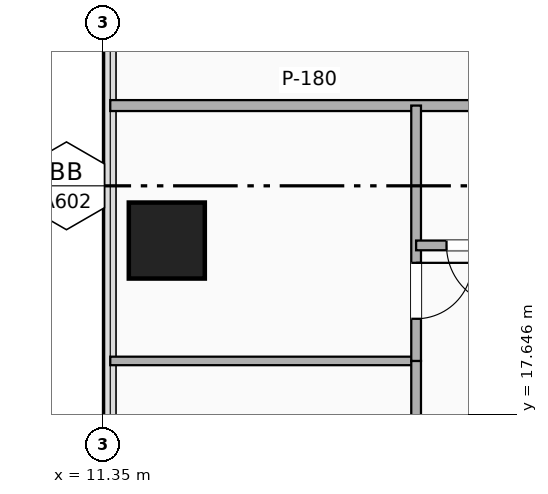
"""IFC4 building model, lengths in metres.
Left out: names, types, materials, properties, quantities, classifications, styles, units other than length and angle.
Written with IfcOpenShell. Run it as: python <this file> out.ifc"""

import sys

from ifc_helpers import new_model, si_unit, direction, frame, frame_2d, origin, origin_2d, place, context, subcontext, project, spatial, rectangle, extrude, element, fill, save


model = new_model("IFC4")
c1 = context("Model", 3, precision=1e-05, world=origin(), true_north=direction((0.0, 1.0)))
c2 = subcontext(c1, "Body", "Model", "MODEL_VIEW")
j1 = project(units=[si_unit("LENGTHUNIT", "METRE"), si_unit("PLANEANGLEUNIT", "RADIAN")], contexts=[c1])
p1 = place(None, origin())
s1 = spatial("IfcSite", under=j1, at=p1, CompositionType="ELEMENT")
p2 = place(p1, origin())
s2 = spatial("IfcBuilding", under=s1, at=p2, CompositionType="ELEMENT")
p3 = place(p2, frame((0.0, 0.0, 83.8)))
s3 = spatial("IfcBuildingStorey", under=s2, at=p3, CompositionType="ELEMENT", Elevation=83.8)
p4 = place(p3, frame((12.4, 20.5, -0.26), z_axis=(0.0, 0.0, 1.0), x_axis=(1.0, 0.0, 0.0)))
e1 = element("IfcColumn", 1, at=p4, inside=s3, PredefinedType="COLUMN", context=c2, shape_type="SweptSolid", body=[
    extrude(rectangle(XDim=1.25, YDim=1.25, at=origin_2d()), origin(), (0.0, 0.0, 1.0), 4.4),
])
p5 = place(p3, frame((11.47, 22.72, 0.0), z_axis=(0.0, 0.0, 1.0), x_axis=(1.0, 0.0, 0.0)))
e2 = element("IfcWall", 2, at=p5, inside=s3, PredefinedType="PARTITIONING", context=c2, shape_type="SweptSolid", body=[
    extrude(rectangle(XDim=6.55, YDim=0.18, at=frame_2d((3.275, 0.0))), origin(), (0.0, 0.0, 1.0), 3.503),
])
p6 = place(p3, frame((11.47, 18.52, 0.0), z_axis=(0.0, 0.0, 1.0), x_axis=(1.0, 0.0, 0.0)))
e3 = element("IfcWall", 3, at=p6, inside=s3, PredefinedType="PARTITIONING", context=c2, shape_type="SweptSolid", body=[
    extrude(rectangle(XDim=5.03, YDim=0.14, at=frame_2d((2.515, 0.0))), origin(), (0.0, 0.0, 1.0), 3.503),
])
p7 = place(p3, frame((16.5, 14.58, 0.0), z_axis=(0.0, 0.0, 1.0), x_axis=(0.0, 1.0, 0.0)))
e4 = element("IfcWall", 4, at=p7, inside=s3, PredefinedType="PARTITIONING", context=c2, shape_type="SweptSolid", body=[
    extrude(rectangle(XDim=3.94, YDim=0.16, at=frame_2d((1.97, 0.0))), origin(), (0.0, 0.0, 1.0), 3.822),
])
p8 = place(p7, frame((1.4, 0.0, 0.0)))
e5 = element("IfcOpeningElement", 5, at=p8, cuts=e4, PredefinedType="OPENING", context=c2, shape_type="SweptSolid", body=[
    extrude(rectangle(XDim=0.92, YDim=2.08, at=frame_2d((0.46, 1.04))), frame((0.0, 0.09, 0.0), z_axis=(0.0, -1.0, 0.0), x_axis=(1.0, 0.0, 0.0)), (0.0, 0.0, 1.0), 0.18),
])
p9 = place(p3, frame((16.5, 18.52, 0.0), z_axis=(0.0, 0.0, 1.0), x_axis=(0.0, 1.0, 0.0)))
e6 = element("IfcWall", 6, at=p9, inside=s3, PredefinedType="PARTITIONING", context=c2, shape_type="SweptSolid", body=[
    extrude(rectangle(XDim=4.2, YDim=0.16, at=frame_2d((2.1, 0.0))), origin(), (0.0, 0.0, 1.0), 3.213),
])
p10 = place(p9, frame((0.693, 0.0, 0.0)))
e7 = element("IfcOpeningElement", 7, at=p10, cuts=e6, PredefinedType="OPENING", context=c2, shape_type="SweptSolid", body=[
    extrude(rectangle(XDim=0.92, YDim=2.08, at=frame_2d((0.46, 1.04))), frame((0.0, 0.09, 0.0), z_axis=(0.0, -1.0, 0.0), x_axis=(1.0, 0.0, 0.0)), (0.0, 0.0, 1.0), 0.18),
])
p11 = place(p3, frame((16.5, 20.42, 0.0), z_axis=(0.0, 0.0, 1.0), x_axis=(1.0, 0.0, 0.0)))
e8 = element("IfcWall", 8, at=p11, inside=s3, PredefinedType="PARTITIONING", context=c2, shape_type="SweptSolid", body=[
    extrude(rectangle(XDim=2.1, YDim=0.16, at=frame_2d((1.05, 0.0))), origin(), (0.0, 0.0, 1.0), 3.213),
])
p12 = place(p11, frame((0.5, 0.0, 0.0)))
e9 = element("IfcOpeningElement", 9, at=p12, cuts=e8, PredefinedType="OPENING", context=c2, shape_type="SweptSolid", body=[
    extrude(rectangle(XDim=1.0, YDim=2.15, at=frame_2d((0.5, 1.075))), frame((0.0, 0.09, 0.0), z_axis=(0.0, -1.0, 0.0), x_axis=(1.0, 0.0, 0.0)), (0.0, 0.0, 1.0), 0.18),
])
p13 = place(p10, origin())
e10 = element("IfcDoor", 10, at=p13, inside=s3, OperationType="SINGLE_SWING_RIGHT", PredefinedType="DOOR", context=c2, shape_type="SweptSolid", body=[
    extrude(rectangle(XDim=0.92, YDim=2.08, at=frame_2d((0.46, 1.04))), frame((0.0, 0.025, 0.0), z_axis=(0.0, -1.0, 0.0), x_axis=(1.0, 0.0, 0.0)), (0.0, 0.0, 1.0), 0.05),
])
fill(e7, e10)
p14 = place(p12, origin())
e11 = element("IfcDoor", 11, at=p14, inside=s3, OperationType="SINGLE_SWING_RIGHT", PredefinedType="DOOR", context=c2, shape_type="SweptSolid", body=[
    extrude(rectangle(XDim=1.0, YDim=2.15, at=frame_2d((0.5, 1.075))), frame((0.0, 0.025, 0.0), z_axis=(0.0, -1.0, 0.0), x_axis=(1.0, 0.0, 0.0)), (0.0, 0.0, 1.0), 0.05),
])
fill(e9, e11)
save(model, sys.argv[1])
